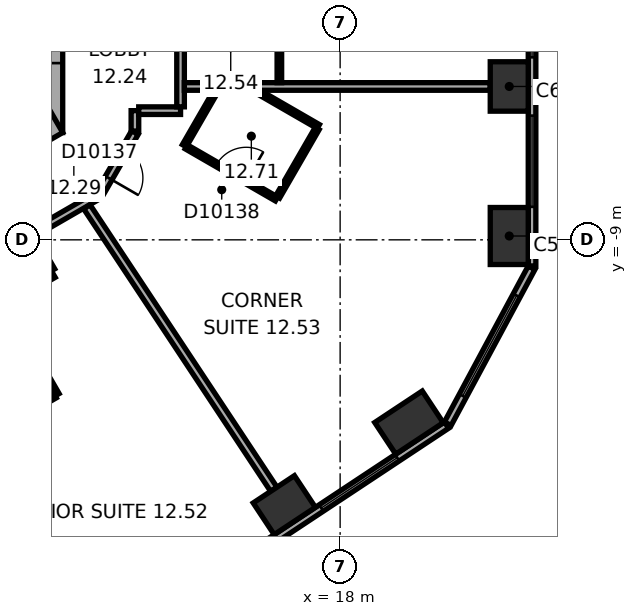
"""IFC4 building model, lengths in metres.
Left out: names, types, materials, properties, quantities, classifications, styles, units other than length and angle.
Written with IfcOpenShell. Run it as: python <this file> out.ifc"""

import sys

from ifc_helpers import new_model, si_unit, direction, frame, frame_2d, origin, origin_2d, place, context, subcontext, project, spatial, rectangle, extrude, element, fill, save


model = new_model("IFC4")
c1 = context("Model", 3, precision=1e-05, world=origin(), true_north=direction((0.0, 1.0)))
c2 = subcontext(c1, "Body", "Model", "MODEL_VIEW")
j1 = project(units=[si_unit("LENGTHUNIT", "METRE"), si_unit("PLANEANGLEUNIT", "RADIAN")], contexts=[c1])
p1 = place(None, origin())
s1 = spatial("IfcSite", under=j1, at=p1, CompositionType="ELEMENT")
p2 = place(p1, origin())
s2 = spatial("IfcBuilding", under=s1, at=p2, CompositionType="ELEMENT")
p3 = place(p2, frame((0.0, 0.0, 60.5)))
s3 = spatial("IfcBuildingStorey", under=s2, at=p3, CompositionType="ELEMENT", Elevation=60.5)
p4 = place(p3, frame((22.45, -8.899, 0.0), z_axis=(0.0, 0.0, 1.0), x_axis=(0.0, 1.0, 0.0)))
e1 = element("IfcColumn", 1, at=p4, inside=s3, PredefinedType="COLUMN", context=c2, shape_type="SweptSolid", body=[
    extrude(rectangle(XDim=1.5, YDim=1.0, at=origin_2d()), origin(), (0.0, 0.0, 1.0), 3.3),
])
for number, where, z_axis, x_axis in (
    (2, (22.45, -4.965, 0.0), (0.0, 0.0, 1.0), (0.0, 1.0, 0.0)),
    (3, (16.531, -15.981, 0.0), (0.0, 0.0, 1.0), (0.834, 0.552, 0.0)),
):
    element("IfcColumn", number, at=place(p3, frame(where, z_axis=z_axis, x_axis=x_axis)), inside=s3, PredefinedType="COLUMN", context=c2, shape_type="SweptSolid", body=[
        extrude(rectangle(XDim=1.3, YDim=1.0, at=origin_2d()), origin(), (0.0, 0.0, 1.0), 3.3),
    ])
p5 = place(p3, frame((19.812, -13.809, 0.0), z_axis=(0.0, 0.0, 1.0), x_axis=(0.833885822067, 0.551936985312, 0.0)))
e4 = element("IfcColumn", 4, at=p5, inside=s3, PredefinedType="COLUMN", context=c2, shape_type="SweptSolid", body=[
    extrude(rectangle(XDim=1.5, YDim=1.0, at=origin_2d()), origin(), (0.0, 0.0, 1.0), 3.3),
])
p6 = place(p3, frame((10.1, -6.177, 0.0), z_axis=(0.0, 0.0, 1.0), x_axis=(0.0, 1.0, 0.0)))
e5 = element("IfcWall", 5, at=p6, inside=s3, PredefinedType="SHEAR", context=c2, shape_type="SweptSolid", body=[
    extrude(rectangle(XDim=12.355, YDim=1.2, at=frame_2d((6.177, 0.0))), origin(), (0.0, 0.0, 1.0), 3.3),
])
p7 = place(p6, frame((6.378, 0.0, 0.0)))
e6 = element("IfcOpeningElement", 6, at=p7, cuts=e5, PredefinedType="OPENING", context=c2, shape_type="SweptSolid", body=[
    extrude(rectangle(XDim=1.5, YDim=2.1, at=frame_2d((0.75, 1.05))), frame((0.0, 0.61, 0.0), z_axis=(0.0, -1.0, 0.0), x_axis=(1.0, 0.0, 0.0)), (0.0, 0.0, 1.0), 1.22),
])
p8 = place(p6, frame((1.828, 0.0, 0.0)))
e7 = element("IfcOpeningElement", 7, at=p8, cuts=e5, PredefinedType="OPENING", context=c2, shape_type="SweptSolid", body=[
    extrude(rectangle(XDim=1.1, YDim=2.1, at=frame_2d((0.55, 1.05))), frame((0.0, 0.61, 0.0), z_axis=(0.0, -1.0, 0.0), x_axis=(1.0, 0.0, 0.0)), (0.0, 0.0, 1.0), 1.22),
])
p9 = place(p6, frame((4.427, 0.0, 0.0)))
e8 = element("IfcOpeningElement", 8, at=p9, cuts=e5, PredefinedType="OPENING", context=c2, shape_type="SweptSolid", body=[
    extrude(rectangle(XDim=1.1, YDim=2.1, at=frame_2d((0.55, 1.05))), frame((0.0, 0.61, 0.0), z_axis=(0.0, -1.0, 0.0), x_axis=(1.0, 0.0, 0.0)), (0.0, 0.0, 1.0), 1.22),
])
p10 = place(p3, frame((-0.3, -11.836, 0.0), z_axis=(0.0, 0.0, 1.0), x_axis=(0.866021384402, 0.500006961711, 0.0)))
e9 = element("IfcWall", 9, at=p10, inside=s3, PredefinedType="SHEAR", context=c2, shape_type="SweptSolid", body=[
    extrude(rectangle(XDim=12.355, YDim=1.2, at=frame_2d((6.178, 0.0))), origin(), (0.0, 0.0, 1.0), 3.3),
])
p11 = place(p10, frame((4.128, 0.0, 0.0)))
e10 = element("IfcOpeningElement", 10, at=p11, cuts=e9, PredefinedType="OPENING", context=c2, shape_type="SweptSolid", body=[
    extrude(rectangle(XDim=0.9, YDim=2.1, at=frame_2d((0.45, 1.05))), frame((0.0, 0.61, 0.0), z_axis=(0.0, -1.0, 0.0), x_axis=(1.0, 0.0, 0.0)), (0.0, 0.0, 1.0), 1.22),
])
p12 = place(p10, frame((7.928, 0.0, 0.0)))
e11 = element("IfcOpeningElement", 11, at=p12, cuts=e9, PredefinedType="OPENING", context=c2, shape_type="SweptSolid", body=[
    extrude(rectangle(XDim=1.1, YDim=2.1, at=frame_2d((0.55, 1.05))), frame((0.0, 0.61, 0.0), z_axis=(0.0, -1.0, 0.0), x_axis=(1.0, 0.0, 0.0)), (0.0, 0.0, 1.0), 1.22),
])
p13 = place(p3, frame((23.05, -9.687, 0.0), z_axis=(0.0, 0.0, 1.0), x_axis=(0.0, 1.0, 0.0)))
e12 = element("IfcWall", 12, at=p13, inside=s3, PredefinedType="STANDARD", context=c2, shape_type="SweptSolid", body=[
    extrude(rectangle(XDim=21.246, YDim=0.2, at=frame_2d((10.623, 0.0))), origin(), (0.0, 0.0, 1.0), 3.3),
])
p14 = place(p13, frame((1.555, 0.0, 0.8)))
e13 = element("IfcOpeningElement", 13, at=p14, cuts=e12, PredefinedType="OPENING", context=c2, shape_type="SweptSolid", body=[
    extrude(rectangle(XDim=2.4, YDim=1.7, at=frame_2d((1.2, 0.85))), frame((0.0, 0.11, 0.0), z_axis=(0.0, -1.0, 0.0), x_axis=(1.0, 0.0, 0.0)), (0.0, 0.0, 1.0), 0.22),
])
p15 = place(p13, frame((5.489, 0.0, 0.8)))
e14 = element("IfcOpeningElement", 14, at=p15, cuts=e12, PredefinedType="OPENING", context=c2, shape_type="SweptSolid", body=[
    extrude(rectangle(XDim=2.4, YDim=1.7, at=frame_2d((1.2, 0.85))), frame((0.0, 0.11, 0.0), z_axis=(0.0, -1.0, 0.0), x_axis=(1.0, 0.0, 0.0)), (0.0, 0.0, 1.0), 0.22),
])
p16 = place(p13, frame((9.424, 0.0, 0.8)))
e15 = element("IfcOpeningElement", 15, at=p16, cuts=e12, PredefinedType="OPENING", context=c2, shape_type="SweptSolid", body=[
    extrude(rectangle(XDim=2.4, YDim=1.7, at=frame_2d((1.2, 0.85))), frame((0.0, 0.11, 0.0), z_axis=(0.0, -1.0, 0.0), x_axis=(1.0, 0.0, 0.0)), (0.0, 0.0, 1.0), 0.22),
])
p17 = place(p13, frame((13.358, 0.0, 0.8)))
e16 = element("IfcOpeningElement", 16, at=p17, cuts=e12, PredefinedType="OPENING", context=c2, shape_type="SweptSolid", body=[
    extrude(rectangle(XDim=2.4, YDim=1.7, at=frame_2d((1.2, 0.85))), frame((0.0, 0.11, 0.0), z_axis=(0.0, -1.0, 0.0), x_axis=(1.0, 0.0, 0.0)), (0.0, 0.0, 1.0), 0.22),
])
p18 = place(p13, frame((17.293, 0.0, 0.8)))
e17 = element("IfcOpeningElement", 17, at=p18, cuts=e12, PredefinedType="OPENING", context=c2, shape_type="SweptSolid", body=[
    extrude(rectangle(XDim=2.4, YDim=1.7, at=frame_2d((1.2, 0.85))), frame((0.0, 0.11, 0.0), z_axis=(0.0, -1.0, 0.0), x_axis=(1.0, 0.0, 0.0)), (0.0, 0.0, 1.0), 0.22),
])
p19 = place(p3, frame((3.083, -25.601, 0.0), z_axis=(0.0, 0.0, 1.0), x_axis=(0.833884295743, 0.551939291329, 0.0)))
e18 = element("IfcWall", 18, at=p19, inside=s3, PredefinedType="STANDARD", context=c2, shape_type="SweptSolid", body=[
    extrude(rectangle(XDim=21.246, YDim=0.2, at=frame_2d((10.623, 0.0))), origin(), (0.0, 0.0, 1.0), 3.3),
])
p20 = place(p19, frame((1.553, 0.0, 0.8)))
e19 = element("IfcOpeningElement", 19, at=p20, cuts=e18, PredefinedType="OPENING", context=c2, shape_type="SweptSolid", body=[
    extrude(rectangle(XDim=2.4, YDim=1.7, at=frame_2d((1.2, 0.85))), frame((0.0, 0.11, 0.0), z_axis=(0.0, -1.0, 0.0), x_axis=(1.0, 0.0, 0.0)), (0.0, 0.0, 1.0), 0.22),
])
p21 = place(p19, frame((5.488, 0.0, 0.8)))
e20 = element("IfcOpeningElement", 20, at=p21, cuts=e18, PredefinedType="OPENING", context=c2, shape_type="SweptSolid", body=[
    extrude(rectangle(XDim=2.4, YDim=1.7, at=frame_2d((1.2, 0.85))), frame((0.0, 0.11, 0.0), z_axis=(0.0, -1.0, 0.0), x_axis=(1.0, 0.0, 0.0)), (0.0, 0.0, 1.0), 0.22),
])
p22 = place(p19, frame((9.422, 0.0, 0.8)))
e21 = element("IfcOpeningElement", 21, at=p22, cuts=e18, PredefinedType="OPENING", context=c2, shape_type="SweptSolid", body=[
    extrude(rectangle(XDim=2.4, YDim=1.7, at=frame_2d((1.2, 0.85))), frame((0.0, 0.11, 0.0), z_axis=(0.0, -1.0, 0.0), x_axis=(1.0, 0.0, 0.0)), (0.0, 0.0, 1.0), 0.22),
])
p23 = place(p19, frame((13.357, 0.0, 0.8)))
e22 = element("IfcOpeningElement", 22, at=p23, cuts=e18, PredefinedType="OPENING", context=c2, shape_type="SweptSolid", body=[
    extrude(rectangle(XDim=2.4, YDim=1.7, at=frame_2d((1.2, 0.85))), frame((0.0, 0.11, 0.0), z_axis=(0.0, -1.0, 0.0), x_axis=(1.0, 0.0, 0.0)), (0.0, 0.0, 1.0), 0.22),
])
p24 = place(p19, frame((17.291, 0.0, 0.8)))
e23 = element("IfcOpeningElement", 23, at=p24, cuts=e18, PredefinedType="OPENING", context=c2, shape_type="SweptSolid", body=[
    extrude(rectangle(XDim=2.4, YDim=1.7, at=frame_2d((1.2, 0.85))), frame((0.0, 0.11, 0.0), z_axis=(0.0, -1.0, 0.0), x_axis=(1.0, 0.0, 0.0)), (0.0, 0.0, 1.0), 0.22),
])
p25 = place(p3, frame((20.833, -13.839, 0.0), z_axis=(0.0, 0.0, 1.0), x_axis=(0.473321668581, 0.880889662813, 0.0)))
e24 = element("IfcWall", 24, at=p25, inside=s3, PredefinedType="STANDARD", context=c2, shape_type="SweptSolid", body=[
    extrude(rectangle(XDim=4.66, YDim=0.2, at=frame_2d((2.33, 0.0))), origin(), (0.0, 0.0, 1.0), 3.3),
])
p26 = place(p25, frame((0.83, 0.0, 0.8)))
e25 = element("IfcOpeningElement", 25, at=p26, cuts=e24, PredefinedType="OPENING", context=c2, shape_type="SweptSolid", body=[
    extrude(rectangle(XDim=3.0, YDim=1.7, at=frame_2d((1.5, 0.85))), frame((0.0, 0.11, 0.0), z_axis=(0.0, -1.0, 0.0), x_axis=(1.0, 0.0, 0.0)), (0.0, 0.0, 1.0), 0.22),
])
p27 = place(p3, frame((7.385, -11.673, 0.0), z_axis=(0.0, 0.0, 1.0), x_axis=(0.866037524642, 0.499979005472, 0.0)))
e26 = element("IfcWall", 26, at=p27, inside=s3, PredefinedType="PARTITIONING", context=c2, shape_type="SweptSolid", body=[
    extrude(rectangle(XDim=3.542, YDim=0.2, at=frame_2d((1.771, 0.0))), origin(), (0.0, 0.0, 1.0), 3.05),
])
p28 = place(p3, frame((9.203, -10.738, 0.0), z_axis=(0.0, 0.0, 1.0), x_axis=(0.50000943426, -0.866019956843, 0.0)))
e27 = element("IfcWall", 27, at=p28, inside=s3, PredefinedType="PARTITIONING", context=c2, shape_type="SweptSolid", body=[
    extrude(rectangle(XDim=2.7, YDim=0.12, at=frame_2d((1.35, 0.0))), origin(), (0.0, 0.0, 1.0), 3.05),
])
p29 = place(p3, frame((9.852, -8.861, 0.0), z_axis=(0.0, 0.0, 1.0), x_axis=(0.866013291437, 0.500020978615, 0.0)))
e28 = element("IfcWall", 28, at=p29, inside=s3, PredefinedType="PARTITIONING", context=c2, shape_type="SweptSolid", body=[
    extrude(rectangle(XDim=2.077, YDim=0.2, at=frame_2d((1.038, 0.0))), origin(), (0.0, 0.0, 1.0), 3.05),
])
p30 = place(p3, frame((10.402, -9.815, 0.0), z_axis=(0.0, 0.0, 1.0), x_axis=(-0.499968756647, 0.866043441391, 0.0)))
e29 = element("IfcWall", 29, at=p30, inside=s3, PredefinedType="PARTITIONING", context=c2, shape_type="SweptSolid", body=[
    extrude(rectangle(XDim=1.001, YDim=0.2, at=frame_2d((0.5, 0.0))), origin(), (0.0, 0.0, 1.0), 3.05),
])
p31 = place(p3, frame((10.501, -13.106, 0.0), z_axis=(0.0, 0.0, 1.0), x_axis=(-0.866013262469, -0.500021028785, 0.0)))
e30 = element("IfcWall", 30, at=p31, inside=s3, PredefinedType="PARTITIONING", context=c2, shape_type="SweptSolid", body=[
    extrude(rectangle(XDim=1.982, YDim=0.12, at=frame_2d((0.991, 0.0))), origin(), (0.0, 0.0, 1.0), 3.05),
])
p32 = place(p3, frame((11.67, -7.788, 0.0), z_axis=(0.0, 0.0, 1.0), x_axis=(0.500063286585, 0.865988862174, 0.0)))
e31 = element("IfcWall", 31, at=p32, inside=s3, PredefinedType="PARTITIONING", context=c2, shape_type="SweptSolid", body=[
    extrude(rectangle(XDim=1.86, YDim=0.2, at=frame_2d((0.93, 0.0))), origin(), (0.0, 0.0, 1.0), 3.05),
])
p33 = place(p32, frame((0.48, 0.0, 0.0)))
e32 = element("IfcOpeningElement", 32, at=p33, cuts=e31, PredefinedType="OPENING", context=c2, shape_type="SweptSolid", body=[
    extrude(rectangle(XDim=0.9, YDim=2.1, at=frame_2d((0.45, 1.05))), frame((0.0, 0.11, 0.0), z_axis=(0.0, -1.0, 0.0), x_axis=(1.0, 0.0, 0.0)), (0.0, 0.0, 1.0), 0.22),
])
p34 = place(p3, frame((12.6, -6.138, 0.0), z_axis=(0.0, 0.0, 1.0), x_axis=(0.0, 1.0, 0.0)))
e33 = element("IfcWall", 33, at=p34, inside=s3, PredefinedType="PARTITIONING", context=c2, shape_type="SweptSolid", body=[
    extrude(rectangle(XDim=0.537, YDim=0.2, at=frame_2d((0.268, 0.0))), origin(), (0.0, 0.0, 1.0), 3.05),
])
p35 = place(p3, frame((12.7, -5.601, 0.0), z_axis=(0.0, 0.0, 1.0), x_axis=(1.0, 0.0, 0.0)))
e34 = element("IfcWall", 34, at=p35, inside=s3, PredefinedType="PARTITIONING", context=c2, shape_type="SweptSolid", body=[
    extrude(rectangle(XDim=1.101, YDim=0.2, at=frame_2d((0.551, 0.0))), origin(), (0.0, 0.0, 1.0), 3.05),
])
p36 = place(p3, frame((13.801, -5.501, 0.0), z_axis=(0.0, 0.0, 1.0), x_axis=(0.0, 1.0, 0.0)))
e35 = element("IfcWall", 35, at=p36, inside=s3, PredefinedType="PARTITIONING", context=c2, shape_type="SweptSolid", body=[
    extrude(rectangle(XDim=5.702, YDim=0.2, at=frame_2d((2.851, 0.0))), origin(), (0.0, 0.0, 1.0), 3.05),
])
p37 = place(p36, frame((3.079, 0.0, 0.0)))
e36 = element("IfcOpeningElement", 36, at=p37, cuts=e35, PredefinedType="OPENING", context=c2, shape_type="SweptSolid", body=[
    extrude(rectangle(XDim=0.9, YDim=2.1, at=frame_2d((0.45, 1.05))), frame((0.0, 0.11, 0.0), z_axis=(0.0, -1.0, 0.0), x_axis=(1.0, 0.0, 0.0)), (0.0, 0.0, 1.0), 0.22),
])
p38 = place(p36, frame((4.636, 0.0, 0.0)))
e37 = element("IfcOpeningElement", 37, at=p38, cuts=e35, PredefinedType="OPENING", context=c2, shape_type="SweptSolid", body=[
    extrude(rectangle(XDim=0.9, YDim=2.1, at=frame_2d((0.45, 1.05))), frame((0.0, 0.11, 0.0), z_axis=(0.0, -1.0, 0.0), x_axis=(1.0, 0.0, 0.0)), (0.0, 0.0, 1.0), 0.22),
])
p39 = place(p3, frame((13.901, -6.524, 0.0), z_axis=(0.0, 0.0, 1.0), x_axis=(0.499964162598, 0.86604609353, 0.0)))
e38 = element("IfcWall", 38, at=p39, inside=s3, PredefinedType="PARTITIONING", context=c2, shape_type="SweptSolid", body=[
    extrude(rectangle(XDim=1.661, YDim=0.12, at=frame_2d((0.831, 0.0))), origin(), (0.0, 0.0, 1.0), 3.05),
])
p40 = place(p3, frame((13.901, -4.965, 0.0), z_axis=(0.0, 0.0, 1.0), x_axis=(1.0, 0.0, 0.0)))
e39 = element("IfcWall", 39, at=p40, inside=s3, PredefinedType="PARTITIONING", context=c2, shape_type="SweptSolid", body=[
    extrude(rectangle(XDim=8.049, YDim=0.2, at=frame_2d((4.024, 0.0))), origin(), (0.0, 0.0, 1.0), 3.05),
])
p41 = place(p3, frame((15.841, -5.104, 0.0), z_axis=(0.0, 0.0, 1.0), x_axis=(0.866025591402, -0.499999675036, 0.0)))
e40 = element("IfcWall", 40, at=p41, inside=s3, PredefinedType="PARTITIONING", context=c2, shape_type="SweptSolid", body=[
    extrude(rectangle(XDim=1.83, YDim=0.12, at=frame_2d((0.915, 0.0))), origin(), (0.0, 0.0, 1.0), 3.05),
])
p42 = place(p3, frame((16.255, -15.564, 0.0), z_axis=(0.0, 0.0, 1.0), x_axis=(-0.55192208744, 0.833895682562, 0.0)))
e41 = element("IfcWall", 41, at=p42, inside=s3, PredefinedType="PARTITIONING", context=c2, shape_type="SweptSolid", body=[
    extrude(rectangle(XDim=8.913, YDim=0.2, at=frame_2d((4.457, 0.0))), origin(), (0.0, 0.0, 1.0), 2.6),
])
p43 = place(p3, frame((16.326, -7.925, 0.0), z_axis=(0.0, 0.0, 1.0), x_axis=(-0.865997131366, 0.500048966069, 0.0)))
e42 = element("IfcWall", 42, at=p43, inside=s3, PredefinedType="PARTITIONING", context=c2, shape_type="SweptSolid", body=[
    extrude(rectangle(XDim=2.74, YDim=0.12, at=frame_2d((1.37, 0.0))), origin(), (0.0, 0.0, 1.0), 3.05),
])
p44 = place(p43, frame((0.92, 0.0, 0.0)))
e43 = element("IfcOpeningElement", 43, at=p44, cuts=e42, PredefinedType="OPENING", context=c2, shape_type="SweptSolid", body=[
    extrude(rectangle(XDim=0.9, YDim=2.1, at=frame_2d((0.45, 1.05))), frame((0.0, 0.07, 0.0), z_axis=(0.0, -1.0, 0.0), x_axis=(1.0, 0.0, 0.0)), (0.0, 0.0, 1.0), 0.14),
])
p45 = place(p3, frame((16.401, -3.025, 0.0), z_axis=(0.0, 0.0, 1.0), x_axis=(0.0, -1.0, 0.0)))
e44 = element("IfcWall", 44, at=p45, inside=s3, PredefinedType="PARTITIONING", context=c2, shape_type="SweptSolid", body=[
    extrude(rectangle(XDim=1.84, YDim=0.12, at=frame_2d((0.92, 0.0))), origin(), (0.0, 0.0, 1.0), 3.05),
])
p46 = place(p3, frame((17.396, -6.071, 0.0), z_axis=(0.0, 0.0, 1.0), x_axis=(-0.500027264788, -0.866009661879, 0.0)))
e45 = element("IfcWall", 45, at=p46, inside=s3, PredefinedType="PARTITIONING", context=c2, shape_type="SweptSolid", body=[
    extrude(rectangle(XDim=2.08, YDim=0.12, at=frame_2d((1.04, 0.0))), origin(), (0.0, 0.0, 1.0), 3.05),
])
p47 = place(p14, origin())
e46 = element("IfcWindow", 46, at=p47, inside=s3, PartitioningType="SINGLE_PANEL", PredefinedType="WINDOW", context=c2, shape_type="SweptSolid", body=[
    extrude(rectangle(XDim=2.4, YDim=1.7, at=frame_2d((1.2, 0.85))), frame((0.0, 0.03, 0.0), z_axis=(0.0, -1.0, 0.0), x_axis=(1.0, 0.0, 0.0)), (0.0, 0.0, 1.0), 0.06),
])
fill(e13, e46)
p48 = place(p15, origin())
e47 = element("IfcWindow", 47, at=p48, inside=s3, PartitioningType="SINGLE_PANEL", PredefinedType="WINDOW", context=c2, shape_type="SweptSolid", body=[
    extrude(rectangle(XDim=2.4, YDim=1.7, at=frame_2d((1.2, 0.85))), frame((0.0, 0.03, 0.0), z_axis=(0.0, -1.0, 0.0), x_axis=(1.0, 0.0, 0.0)), (0.0, 0.0, 1.0), 0.06),
])
fill(e14, e47)
p49 = place(p24, origin())
e48 = element("IfcWindow", 48, at=p49, inside=s3, PartitioningType="SINGLE_PANEL", PredefinedType="WINDOW", context=c2, shape_type="SweptSolid", body=[
    extrude(rectangle(XDim=2.4, YDim=1.7, at=frame_2d((1.2, 0.85))), frame((0.0, 0.03, 0.0), z_axis=(0.0, -1.0, 0.0), x_axis=(1.0, 0.0, 0.0)), (0.0, 0.0, 1.0), 0.06),
])
fill(e23, e48)
p50 = place(p26, origin())
e49 = element("IfcWindow", 49, at=p50, inside=s3, PartitioningType="SINGLE_PANEL", PredefinedType="WINDOW", context=c2, shape_type="SweptSolid", body=[
    extrude(rectangle(XDim=3.0, YDim=1.7, at=frame_2d((1.5, 0.85))), frame((0.0, 0.03, 0.0), z_axis=(0.0, -1.0, 0.0), x_axis=(1.0, 0.0, 0.0)), (0.0, 0.0, 1.0), 0.06),
])
fill(e25, e49)
p51 = place(p33, origin())
e50 = element("IfcDoor", 50, at=p51, inside=s3, OperationType="SINGLE_SWING_LEFT", PredefinedType="DOOR", context=c2, shape_type="SweptSolid", body=[
    extrude(rectangle(XDim=0.9, YDim=2.1, at=frame_2d((0.45, 1.05))), frame((0.0, 0.025, 0.0), z_axis=(0.0, -1.0, 0.0), x_axis=(1.0, 0.0, 0.0)), (0.0, 0.0, 1.0), 0.05),
])
fill(e32, e50)
p52 = place(p44, origin())
e51 = element("IfcDoor", 51, at=p52, inside=s3, OperationType="SINGLE_SWING_LEFT", PredefinedType="DOOR", context=c2, shape_type="SweptSolid", body=[
    extrude(rectangle(XDim=0.9, YDim=2.1, at=frame_2d((0.45, 1.05))), frame((0.0, 0.025, 0.0), z_axis=(0.0, -1.0, 0.0), x_axis=(1.0, 0.0, 0.0)), (0.0, 0.0, 1.0), 0.05),
])
fill(e43, e51)
save(model, sys.argv[1])
